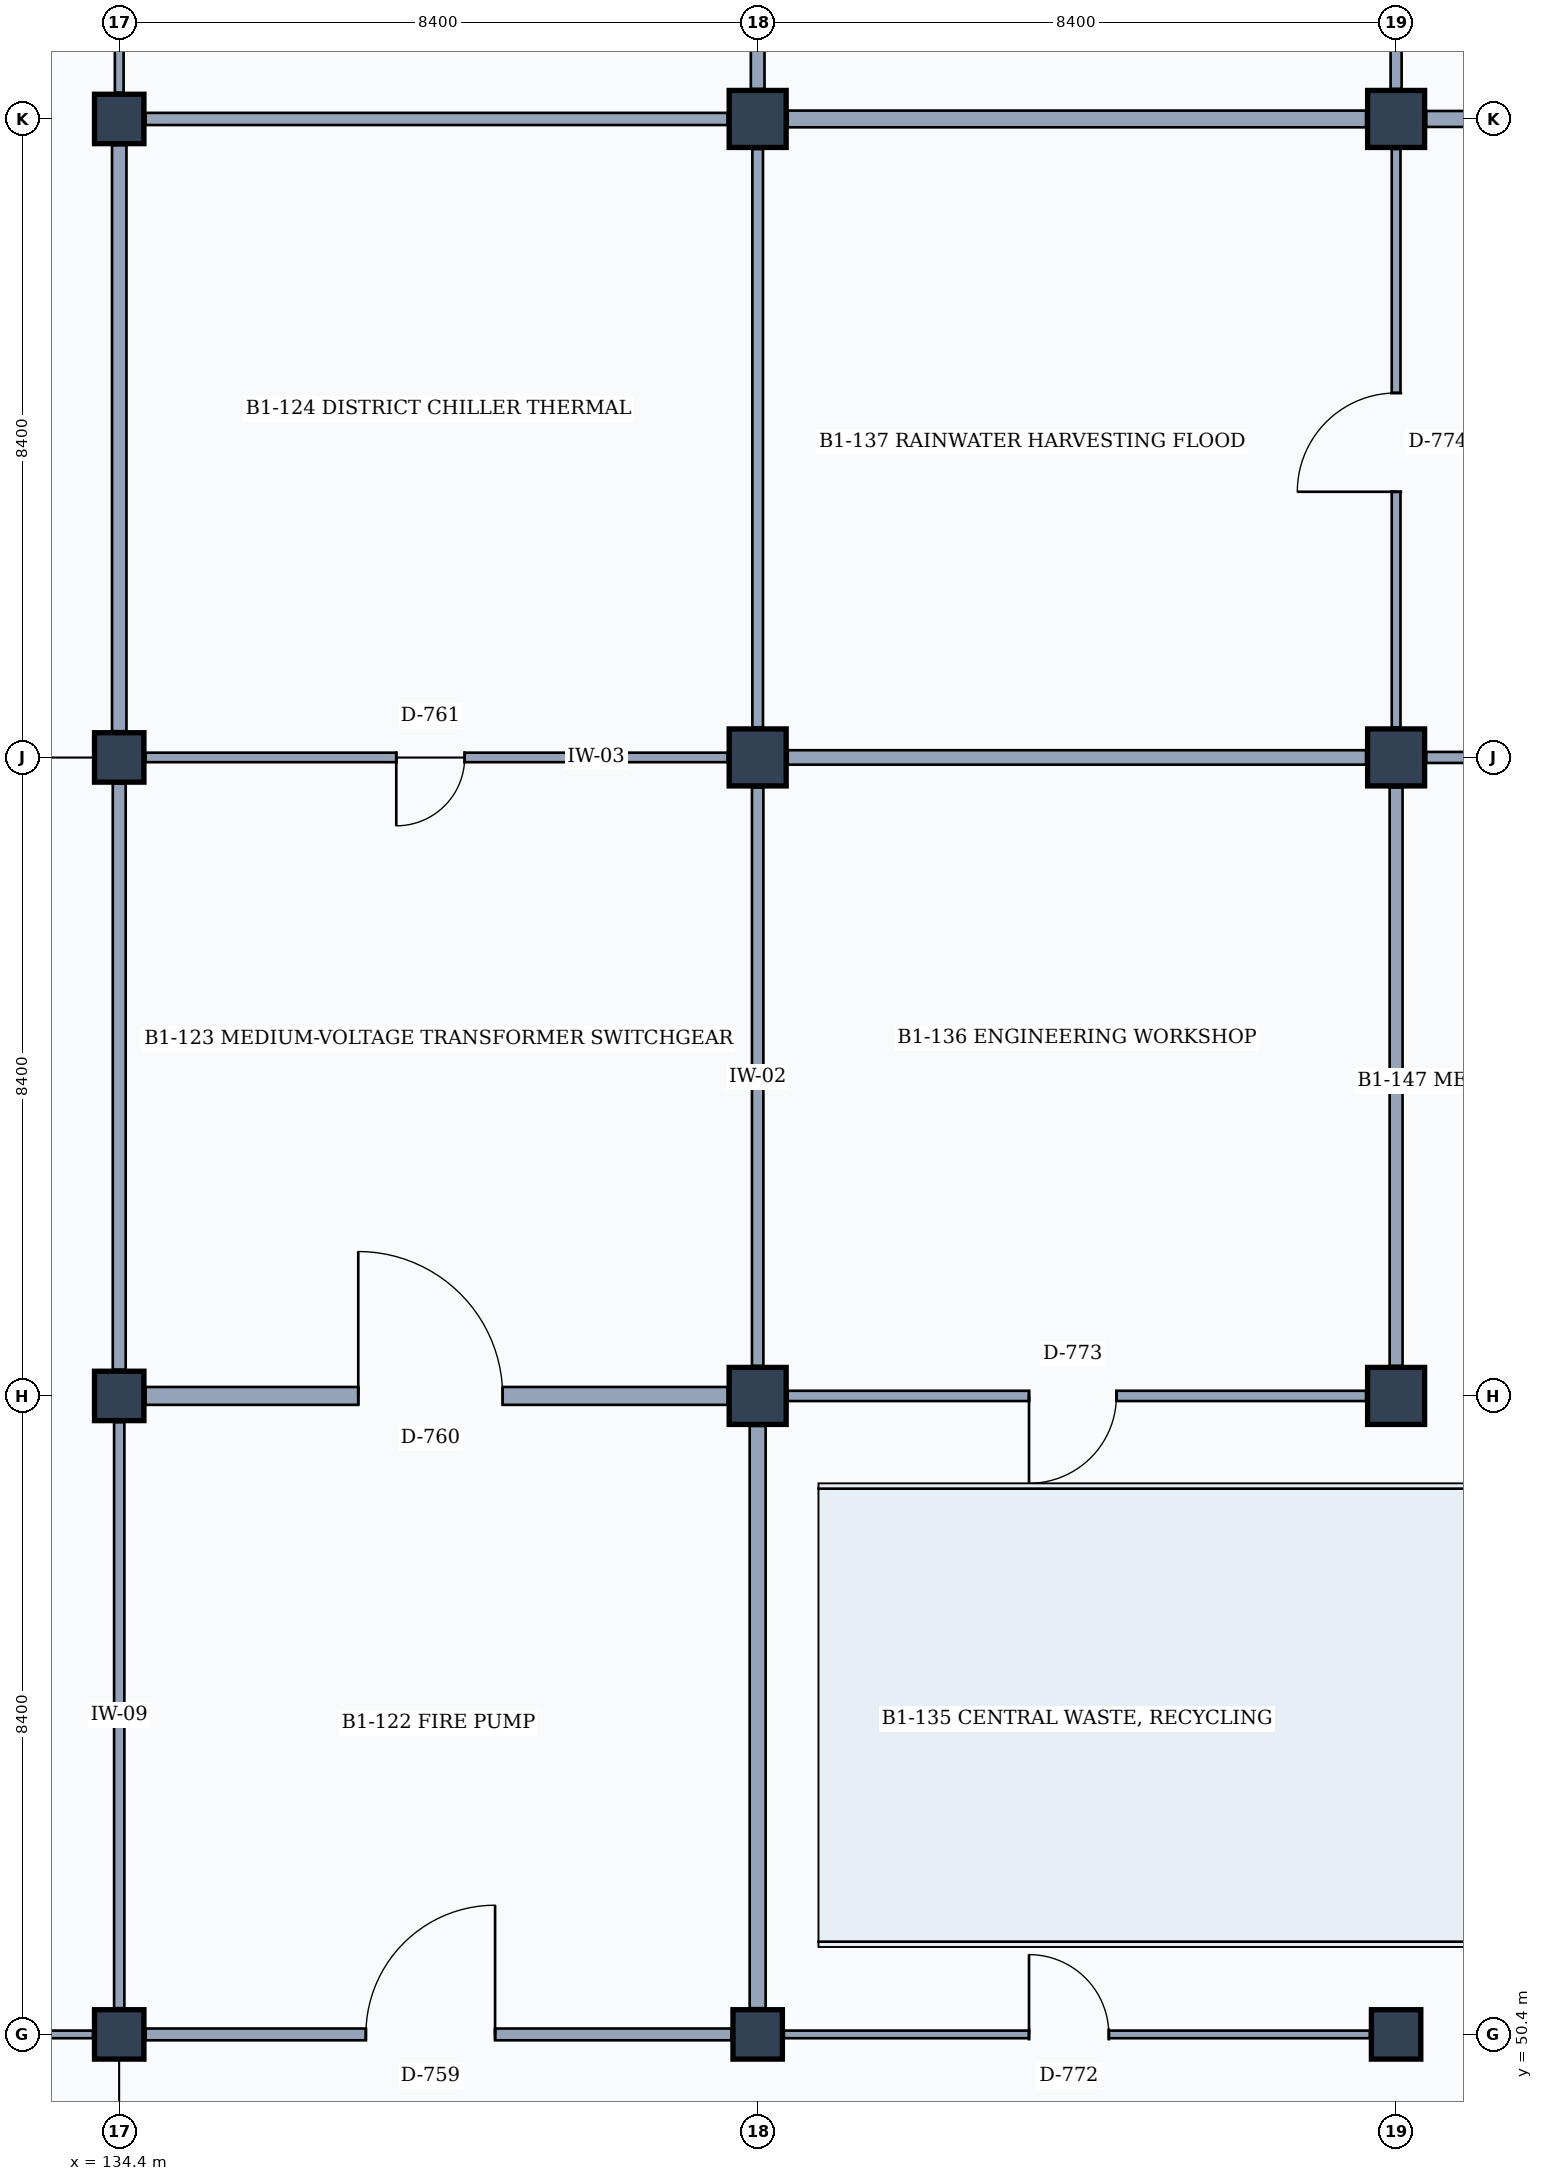
"""IFC4 building model, lengths in metres.
Left out: names, types, materials, properties, quantities, classifications, styles, units other than length and angle.
Written with IfcOpenShell. Run it as: python <this file> out.ifc"""

import sys

from ifc_helpers import new_model, si_unit, direction, frame, frame_2d, origin, origin_2d, place, context, subcontext, project, spatial, rectangle, extrude, element, fill, save


model = new_model("IFC4")
c1 = context("Model", 3, precision=1e-05, world=origin(), true_north=direction((0.0, 1.0)))
c2 = subcontext(c1, "Body", "Model", "MODEL_VIEW")
j1 = project(units=[si_unit("LENGTHUNIT", "METRE"), si_unit("PLANEANGLEUNIT", "RADIAN")], contexts=[c1])
p1 = place(None, origin())
s1 = spatial("IfcSite", under=j1, at=p1, CompositionType="ELEMENT")
p2 = place(p1, origin())
s2 = spatial("IfcBuilding", under=s1, at=p2, CompositionType="ELEMENT")
p3 = place(p2, frame((0.0, 0.0, -4.2)))
s3 = spatial("IfcBuildingStorey", under=s2, at=p3, CompositionType="ELEMENT", Elevation=-4.2)
for number, where, z_axis, x_axis in (
    (1, (134.4, 50.4, 0.0), (0.0, 0.0, 1.0), (1.0, 0.0, 0.0)),
    (2, (134.4, 58.8, 0.0), (0.0, 0.0, 1.0), (1.0, 0.0, 0.0)),
    (3, (134.4, 67.2, 0.0), (0.0, 0.0, 1.0), (1.0, 0.0, 0.0)),
    (4, (134.4, 75.6, 0.0), (0.0, 0.0, 1.0), (1.0, 0.0, 0.0)),
    (5, (142.8, 50.4, 0.0), (0.0, 0.0, 1.0), (1.0, 0.0, 0.0)),
):
    element("IfcColumn", number, at=place(p3, frame(where, z_axis=z_axis, x_axis=x_axis)), inside=s3, PredefinedType="COLUMN", context=c2, shape_type="SweptSolid", body=[
        extrude(rectangle(XDim=0.65, YDim=0.65, at=origin_2d()), origin(), (0.0, 0.0, 1.0), 4.2),
    ])
for number, where, z_axis, x_axis in (
    (6, (142.8, 58.8, 0.0), (0.0, 0.0, 1.0), (1.0, 0.0, 0.0)),
    (7, (142.8, 67.2, 0.0), (0.0, 0.0, 1.0), (1.0, 0.0, 0.0)),
    (8, (142.8, 75.6, 0.0), (0.0, 0.0, 1.0), (1.0, 0.0, 0.0)),
):
    element("IfcColumn", number, at=place(p3, frame(where, z_axis=z_axis, x_axis=x_axis)), inside=s3, PredefinedType="COLUMN", context=c2, shape_type="SweptSolid", body=[
        extrude(rectangle(XDim=0.75, YDim=0.75, at=origin_2d()), origin(), (0.0, 0.0, 1.0), 4.2),
    ])
p4 = place(p3, frame((151.2, 50.4, 0.0), z_axis=(0.0, 0.0, 1.0), x_axis=(1.0, 0.0, 0.0)))
e9 = element("IfcColumn", 9, at=p4, inside=s3, PredefinedType="COLUMN", context=c2, shape_type="SweptSolid", body=[
    extrude(rectangle(XDim=0.65, YDim=0.65, at=origin_2d()), origin(), (0.0, 0.0, 1.0), 4.2),
])
for number, where, z_axis, x_axis in (
    (10, (151.2, 58.8, 0.0), (0.0, 0.0, 1.0), (1.0, 0.0, 0.0)),
    (11, (151.2, 67.2, 0.0), (0.0, 0.0, 1.0), (1.0, 0.0, 0.0)),
    (12, (151.2, 75.6, 0.0), (0.0, 0.0, 1.0), (1.0, 0.0, 0.0)),
):
    element("IfcColumn", number, at=place(p3, frame(where, z_axis=z_axis, x_axis=x_axis)), inside=s3, PredefinedType="COLUMN", context=c2, shape_type="SweptSolid", body=[
        extrude(rectangle(XDim=0.75, YDim=0.75, at=origin_2d()), origin(), (0.0, 0.0, 1.0), 4.2),
    ])
p5 = place(p3, frame((126.295, 50.4, 0.0), z_axis=(0.0, 0.0, 1.0), x_axis=(1.0, 0.0, 0.0)))
e13 = element("IfcWall", 13, at=p5, inside=s3, PredefinedType="MOVABLE", context=c2, shape_type="SweptSolid", body=[
    extrude(rectangle(XDim=7.76, YDim=0.1, at=frame_2d((3.88, 0.0))), origin(), (0.0, 0.0, 1.0), 2.95),
])
p6 = place(p5, frame((3.275, 0.0, 0.0)))
e14 = element("IfcOpeningElement", 14, at=p6, cuts=e13, PredefinedType="OPENING", context=c2, shape_type="SweptSolid", body=[
    extrude(rectangle(XDim=0.95, YDim=2.15, at=frame_2d((0.475, 1.075))), frame((0.0, 0.06, 0.0), z_axis=(0.0, -1.0, 0.0), x_axis=(1.0, 0.0, 0.0)), (0.0, 0.0, 1.0), 0.12),
])
p7 = place(p3, frame((134.4, 50.745, 0.0), z_axis=(0.0, 0.0, 1.0), x_axis=(0.0, 1.0, 0.0)))
e15 = element("IfcWall", 15, at=p7, inside=s3, PredefinedType="PARTITIONING", context=c2, shape_type="SweptSolid", body=[
    extrude(rectangle(XDim=7.71, YDim=0.135, at=frame_2d((3.855, 0.0))), origin(), (0.0, 0.0, 1.0), 3.1),
])
p8 = place(p3, frame((134.4, 59.145, 0.0), z_axis=(0.0, 0.0, 1.0), x_axis=(0.0, 1.0, 0.0)))
e16 = element("IfcWall", 16, at=p8, inside=s3, PredefinedType="PARTITIONING", context=c2, shape_type="SweptSolid", body=[
    extrude(rectangle(XDim=7.71, YDim=0.17, at=frame_2d((3.855, 0.0))), origin(), (0.0, 0.0, 1.0), 3.1),
])
p9 = place(p3, frame((134.4, 67.545, 0.0), z_axis=(0.0, 0.0, 1.0), x_axis=(0.0, 1.0, 0.0)))
e17 = element("IfcWall", 17, at=p9, inside=s3, PredefinedType="PARTITIONING", context=c2, shape_type="SweptSolid", body=[
    extrude(rectangle(XDim=7.71, YDim=0.19, at=frame_2d((3.855, 0.0))), origin(), (0.0, 0.0, 1.0), 3.1),
])
p10 = place(p3, frame((134.4, 75.945, 0.0), z_axis=(0.0, 0.0, 1.0), x_axis=(0.0, 1.0, 0.0)))
e18 = element("IfcWall", 18, at=p10, inside=s3, PredefinedType="PARTITIONING", context=c2, shape_type="SweptSolid", body=[
    extrude(rectangle(XDim=7.71, YDim=0.115, at=frame_2d((3.855, 0.0))), origin(), (0.0, 0.0, 1.0), 3.08),
])
p11 = place(p3, frame((134.745, 50.4, 0.0), z_axis=(0.0, 0.0, 1.0), x_axis=(1.0, 0.0, 0.0)))
e19 = element("IfcWall", 19, at=p11, inside=s3, PredefinedType="PARTITIONING", context=c2, shape_type="SweptSolid", body=[
    extrude(rectangle(XDim=7.71, YDim=0.155, at=frame_2d((3.855, 0.0))), origin(), (0.0, 0.0, 1.0), 3.05),
])
p12 = place(p11, frame((2.9, 0.0, 0.0)))
e20 = element("IfcOpeningElement", 20, at=p12, cuts=e19, PredefinedType="OPENING", context=c2, shape_type="SweptSolid", body=[
    extrude(rectangle(XDim=1.7, YDim=2.3, at=frame_2d((0.85, 1.15))), frame((0.0, 0.087, 0.0), z_axis=(0.0, -1.0, 0.0), x_axis=(1.0, 0.0, 0.0)), (0.0, 0.0, 1.0), 0.175),
])
p13 = place(p3, frame((142.8, 50.745, 0.0), z_axis=(0.0, 0.0, 1.0), x_axis=(0.0, 1.0, 0.0)))
e21 = element("IfcWall", 21, at=p13, inside=s3, PredefinedType="PARTITIONING", context=c2, shape_type="SweptSolid", body=[
    extrude(rectangle(XDim=7.66, YDim=0.21, at=frame_2d((3.83, 0.0))), origin(), (0.0, 0.0, 1.0), 3.1),
])
p14 = place(p3, frame((134.745, 58.8, 0.0), z_axis=(0.0, 0.0, 1.0), x_axis=(1.0, 0.0, 0.0)))
e22 = element("IfcWall", 22, at=p14, inside=s3, PredefinedType="PARTITIONING", context=c2, shape_type="SweptSolid", body=[
    extrude(rectangle(XDim=7.66, YDim=0.235, at=frame_2d((3.83, 0.0))), origin(), (0.0, 0.0, 1.0), 3.05),
])
p15 = place(p14, frame((2.8, 0.0, 0.0)))
e23 = element("IfcOpeningElement", 23, at=p15, cuts=e22, PredefinedType="OPENING", context=c2, shape_type="SweptSolid", body=[
    extrude(rectangle(XDim=1.9, YDim=2.4, at=frame_2d((0.95, 1.2))), frame((0.0, 0.127, 0.0), z_axis=(0.0, -1.0, 0.0), x_axis=(1.0, 0.0, 0.0)), (0.0, 0.0, 1.0), 0.255),
])
p16 = place(p3, frame((142.8, 59.195, 0.0), z_axis=(0.0, 0.0, 1.0), x_axis=(0.0, 1.0, 0.0)))
e24 = element("IfcWall", 24, at=p16, inside=s3, PredefinedType="PARTITIONING", context=c2, shape_type="SweptSolid", body=[
    extrude(rectangle(XDim=7.61, YDim=0.15, at=frame_2d((3.805, 0.0))), origin(), (0.0, 0.0, 1.0), 3.1),
])
p17 = place(p3, frame((134.745, 67.2, 0.0), z_axis=(0.0, 0.0, 1.0), x_axis=(1.0, 0.0, 0.0)))
e25 = element("IfcWall", 25, at=p17, inside=s3, PredefinedType="PARTITIONING", context=c2, shape_type="SweptSolid", body=[
    extrude(rectangle(XDim=7.66, YDim=0.125, at=frame_2d((3.83, 0.0))), origin(), (0.0, 0.0, 1.0), 3.05),
])
p18 = place(p17, frame((3.3, 0.0, 0.0)))
e26 = element("IfcOpeningElement", 26, at=p18, cuts=e25, PredefinedType="OPENING", context=c2, shape_type="SweptSolid", body=[
    extrude(rectangle(XDim=0.9, YDim=2.1, at=frame_2d((0.45, 1.05))), frame((0.0, 0.073, 0.0), z_axis=(0.0, -1.0, 0.0), x_axis=(1.0, 0.0, 0.0)), (0.0, 0.0, 1.0), 0.145),
])
p19 = place(p3, frame((142.8, 67.595, 0.0), z_axis=(0.0, 0.0, 1.0), x_axis=(0.0, 1.0, 0.0)))
e27 = element("IfcWall", 27, at=p19, inside=s3, PredefinedType="PARTITIONING", context=c2, shape_type="SweptSolid", body=[
    extrude(rectangle(XDim=7.61, YDim=0.14, at=frame_2d((3.805, 0.0))), origin(), (0.0, 0.0, 1.0), 3.1),
])
p20 = place(p3, frame((134.745, 75.6, 0.0), z_axis=(0.0, 0.0, 1.0), x_axis=(1.0, 0.0, 0.0)))
e28 = element("IfcWall", 28, at=p20, inside=s3, PredefinedType="PARTITIONING", context=c2, shape_type="SweptSolid", body=[
    extrude(rectangle(XDim=7.66, YDim=0.16, at=frame_2d((3.83, 0.0))), origin(), (0.0, 0.0, 1.0), 3.05),
])
p21 = place(p3, frame((142.8, 75.995, 0.0), z_axis=(0.0, 0.0, 1.0), x_axis=(0.0, 1.0, 0.0)))
e29 = element("IfcWall", 29, at=p21, inside=s3, PredefinedType="PARTITIONING", context=c2, shape_type="SweptSolid", body=[
    extrude(rectangle(XDim=7.61, YDim=0.18, at=frame_2d((3.805, 0.0))), origin(), (0.0, 0.0, 1.0), 3.1),
])
p22 = place(p21, frame((3.125, 0.0, 0.0)))
e30 = element("IfcOpeningElement", 30, at=p22, cuts=e29, PredefinedType="OPENING", context=c2, shape_type="SweptSolid", body=[
    extrude(rectangle(XDim=1.25, YDim=2.3, at=frame_2d((0.625, 1.15))), frame((0.0, 0.1, 0.0), z_axis=(0.0, -1.0, 0.0), x_axis=(1.0, 0.0, 0.0)), (0.0, 0.0, 1.0), 0.2),
])
p23 = place(p3, frame((143.145, 50.4, 0.0), z_axis=(0.0, 0.0, 1.0), x_axis=(1.0, 0.0, 0.0)))
e31 = element("IfcWall", 31, at=p23, inside=s3, PredefinedType="MOVABLE", context=c2, shape_type="SweptSolid", body=[
    extrude(rectangle(XDim=7.71, YDim=0.1, at=frame_2d((3.855, 0.0))), origin(), (0.0, 0.0, 1.0), 3.05),
])
p24 = place(p23, frame((3.225, 0.0, 0.0)))
e32 = element("IfcOpeningElement", 32, at=p24, cuts=e31, PredefinedType="OPENING", context=c2, shape_type="SweptSolid", body=[
    extrude(rectangle(XDim=1.05, YDim=2.2, at=frame_2d((0.525, 1.1))), frame((0.0, 0.06, 0.0), z_axis=(0.0, -1.0, 0.0), x_axis=(1.0, 0.0, 0.0)), (0.0, 0.0, 1.0), 0.12),
])
p25 = place(p3, frame((143.195, 58.8, 0.0), z_axis=(0.0, 0.0, 1.0), x_axis=(1.0, 0.0, 0.0)))
e33 = element("IfcWall", 33, at=p25, inside=s3, PredefinedType="PARTITIONING", context=c2, shape_type="SweptSolid", body=[
    extrude(rectangle(XDim=7.61, YDim=0.135, at=frame_2d((3.805, 0.0))), origin(), (0.0, 0.0, 1.0), 3.05),
])
p26 = place(p25, frame((3.175, 0.0, 0.0)))
e34 = element("IfcOpeningElement", 34, at=p26, cuts=e33, PredefinedType="OPENING", context=c2, shape_type="SweptSolid", body=[
    extrude(rectangle(XDim=1.15, YDim=2.25, at=frame_2d((0.575, 1.125))), frame((0.0, 0.077, 0.0), z_axis=(0.0, -1.0, 0.0), x_axis=(1.0, 0.0, 0.0)), (0.0, 0.0, 1.0), 0.155),
])
p27 = place(p3, frame((151.2, 59.195, 0.0), z_axis=(0.0, 0.0, 1.0), x_axis=(0.0, 1.0, 0.0)))
e35 = element("IfcWall", 35, at=p27, inside=s3, PredefinedType="PARTITIONING", context=c2, shape_type="SweptSolid", body=[
    extrude(rectangle(XDim=7.61, YDim=0.17, at=frame_2d((3.805, 0.0))), origin(), (0.0, 0.0, 1.0), 3.1),
])
p28 = place(p3, frame((143.195, 67.2, 0.0), z_axis=(0.0, 0.0, 1.0), x_axis=(1.0, 0.0, 0.0)))
e36 = element("IfcWall", 36, at=p28, inside=s3, PredefinedType="PARTITIONING", context=c2, shape_type="SweptSolid", body=[
    extrude(rectangle(XDim=7.61, YDim=0.19, at=frame_2d((3.805, 0.0))), origin(), (0.0, 0.0, 1.0), 3.05),
])
p29 = place(p3, frame((151.2, 67.595, 0.0), z_axis=(0.0, 0.0, 1.0), x_axis=(0.0, 1.0, 0.0)))
e37 = element("IfcWall", 37, at=p29, inside=s3, PredefinedType="PARTITIONING", context=c2, shape_type="SweptSolid", body=[
    extrude(rectangle(XDim=7.61, YDim=0.115, at=frame_2d((3.805, 0.0))), origin(), (0.0, 0.0, 1.0), 3.1),
])
p30 = place(p29, frame((3.1, 0.0, 0.0)))
e38 = element("IfcOpeningElement", 38, at=p30, cuts=e37, PredefinedType="OPENING", context=c2, shape_type="SweptSolid", body=[
    extrude(rectangle(XDim=1.3, YDim=2.2, at=frame_2d((0.65, 1.1))), frame((0.0, 0.067, 0.0), z_axis=(0.0, -1.0, 0.0), x_axis=(1.0, 0.0, 0.0)), (0.0, 0.0, 1.0), 0.135),
])
p31 = place(p3, frame((143.195, 75.6, 0.0), z_axis=(0.0, 0.0, 1.0), x_axis=(1.0, 0.0, 0.0)))
e39 = element("IfcWall", 39, at=p31, inside=s3, PredefinedType="PARTITIONING", context=c2, shape_type="SweptSolid", body=[
    extrude(rectangle(XDim=7.61, YDim=0.22, at=frame_2d((3.805, 0.0))), origin(), (0.0, 0.0, 1.0), 3.05),
])
p32 = place(p3, frame((151.2, 75.995, 0.0), z_axis=(0.0, 0.0, 1.0), x_axis=(0.0, 1.0, 0.0)))
e40 = element("IfcWall", 40, at=p32, inside=s3, PredefinedType="PARTITIONING", context=c2, shape_type="SweptSolid", body=[
    extrude(rectangle(XDim=7.61, YDim=0.145, at=frame_2d((3.805, 0.0))), origin(), (0.0, 0.0, 1.0), 3.1),
])
p33 = place(p32, frame((2.975, 0.0, 0.0)))
e41 = element("IfcOpeningElement", 41, at=p33, cuts=e40, PredefinedType="OPENING", context=c2, shape_type="SweptSolid", body=[
    extrude(rectangle(XDim=1.55, YDim=2.35, at=frame_2d((0.775, 1.175))), frame((0.0, 0.083, 0.0), z_axis=(0.0, -1.0, 0.0), x_axis=(1.0, 0.0, 0.0)), (0.0, 0.0, 1.0), 0.165),
])
p34 = place(p3, frame((151.595, 67.2, 0.0), z_axis=(0.0, 0.0, 1.0), x_axis=(1.0, 0.0, 0.0)))
e42 = element("IfcWall", 42, at=p34, inside=s3, PredefinedType="PARTITIONING", context=c2, shape_type="SweptSolid", body=[
    extrude(rectangle(XDim=7.61, YDim=0.145, at=frame_2d((3.805, 0.0))), origin(), (0.0, 0.0, 1.0), 3.05),
])
p35 = place(p3, frame((151.595, 75.6, 0.0), z_axis=(0.0, 0.0, 1.0), x_axis=(1.0, 0.0, 0.0)))
e43 = element("IfcWall", 43, at=p35, inside=s3, PredefinedType="PARTITIONING", context=c2, shape_type="SweptSolid", body=[
    extrude(rectangle(XDim=7.61, YDim=0.21, at=frame_2d((3.805, 0.0))), origin(), (0.0, 0.0, 1.0), 3.05),
])
p36 = place(p12, origin())
e44 = element("IfcDoor", 44, at=p36, inside=s3, OperationType="SINGLE_SWING_RIGHT", PredefinedType="DOOR", context=c2, shape_type="SweptSolid", body=[
    extrude(rectangle(XDim=1.7, YDim=2.3, at=frame_2d((0.85, 1.15))), frame((0.0, 0.025, 0.0), z_axis=(0.0, -1.0, 0.0), x_axis=(1.0, 0.0, 0.0)), (0.0, 0.0, 1.0), 0.05),
])
fill(e20, e44)
p37 = place(p15, origin())
e45 = element("IfcDoor", 45, at=p37, inside=s3, OperationType="SINGLE_SWING_LEFT", PredefinedType="DOOR", context=c2, shape_type="SweptSolid", body=[
    extrude(rectangle(XDim=1.9, YDim=2.4, at=frame_2d((0.95, 1.2))), frame((0.0, 0.025, 0.0), z_axis=(0.0, -1.0, 0.0), x_axis=(1.0, 0.0, 0.0)), (0.0, 0.0, 1.0), 0.05),
])
fill(e23, e45)
p38 = place(p18, frame((0.9, 0.0, 0.0), z_axis=(0.0, 0.0, 1.0), x_axis=(-1.0, 0.0, 0.0)))
e46 = element("IfcDoor", 46, at=p38, inside=s3, OperationType="SINGLE_SWING_RIGHT", PredefinedType="DOOR", context=c2, shape_type="SweptSolid", body=[
    extrude(rectangle(XDim=0.9, YDim=2.1, at=frame_2d((0.45, 1.05))), frame((0.0, 0.025, 0.0), z_axis=(0.0, -1.0, 0.0), x_axis=(1.0, 0.0, 0.0)), (0.0, 0.0, 1.0), 0.05),
])
fill(e26, e46)
p39 = place(p24, origin())
e47 = element("IfcDoor", 47, at=p39, inside=s3, OperationType="SINGLE_SWING_LEFT", PredefinedType="DOOR", context=c2, shape_type="SweptSolid", body=[
    extrude(rectangle(XDim=1.05, YDim=2.2, at=frame_2d((0.525, 1.1))), frame((0.0, 0.025, 0.0), z_axis=(0.0, -1.0, 0.0), x_axis=(1.0, 0.0, 0.0)), (0.0, 0.0, 1.0), 0.05),
])
fill(e32, e47)
p40 = place(p26, frame((1.15, 0.0, 0.0), z_axis=(0.0, 0.0, 1.0), x_axis=(-1.0, 0.0, 0.0)))
e48 = element("IfcDoor", 48, at=p40, inside=s3, OperationType="SINGLE_SWING_RIGHT", PredefinedType="DOOR", context=c2, shape_type="SweptSolid", body=[
    extrude(rectangle(XDim=1.15, YDim=2.25, at=frame_2d((0.575, 1.125))), frame((0.0, 0.025, 0.0), z_axis=(0.0, -1.0, 0.0), x_axis=(1.0, 0.0, 0.0)), (0.0, 0.0, 1.0), 0.05),
])
fill(e34, e48)
p41 = place(p30, origin())
e49 = element("IfcDoor", 49, at=p41, inside=s3, OperationType="SINGLE_SWING_LEFT", PredefinedType="DOOR", context=c2, shape_type="SweptSolid", body=[
    extrude(rectangle(XDim=1.3, YDim=2.2, at=frame_2d((0.65, 1.1))), frame((0.0, 0.025, 0.0), z_axis=(0.0, -1.0, 0.0), x_axis=(1.0, 0.0, 0.0)), (0.0, 0.0, 1.0), 0.05),
])
fill(e38, e49)
save(model, sys.argv[1])
